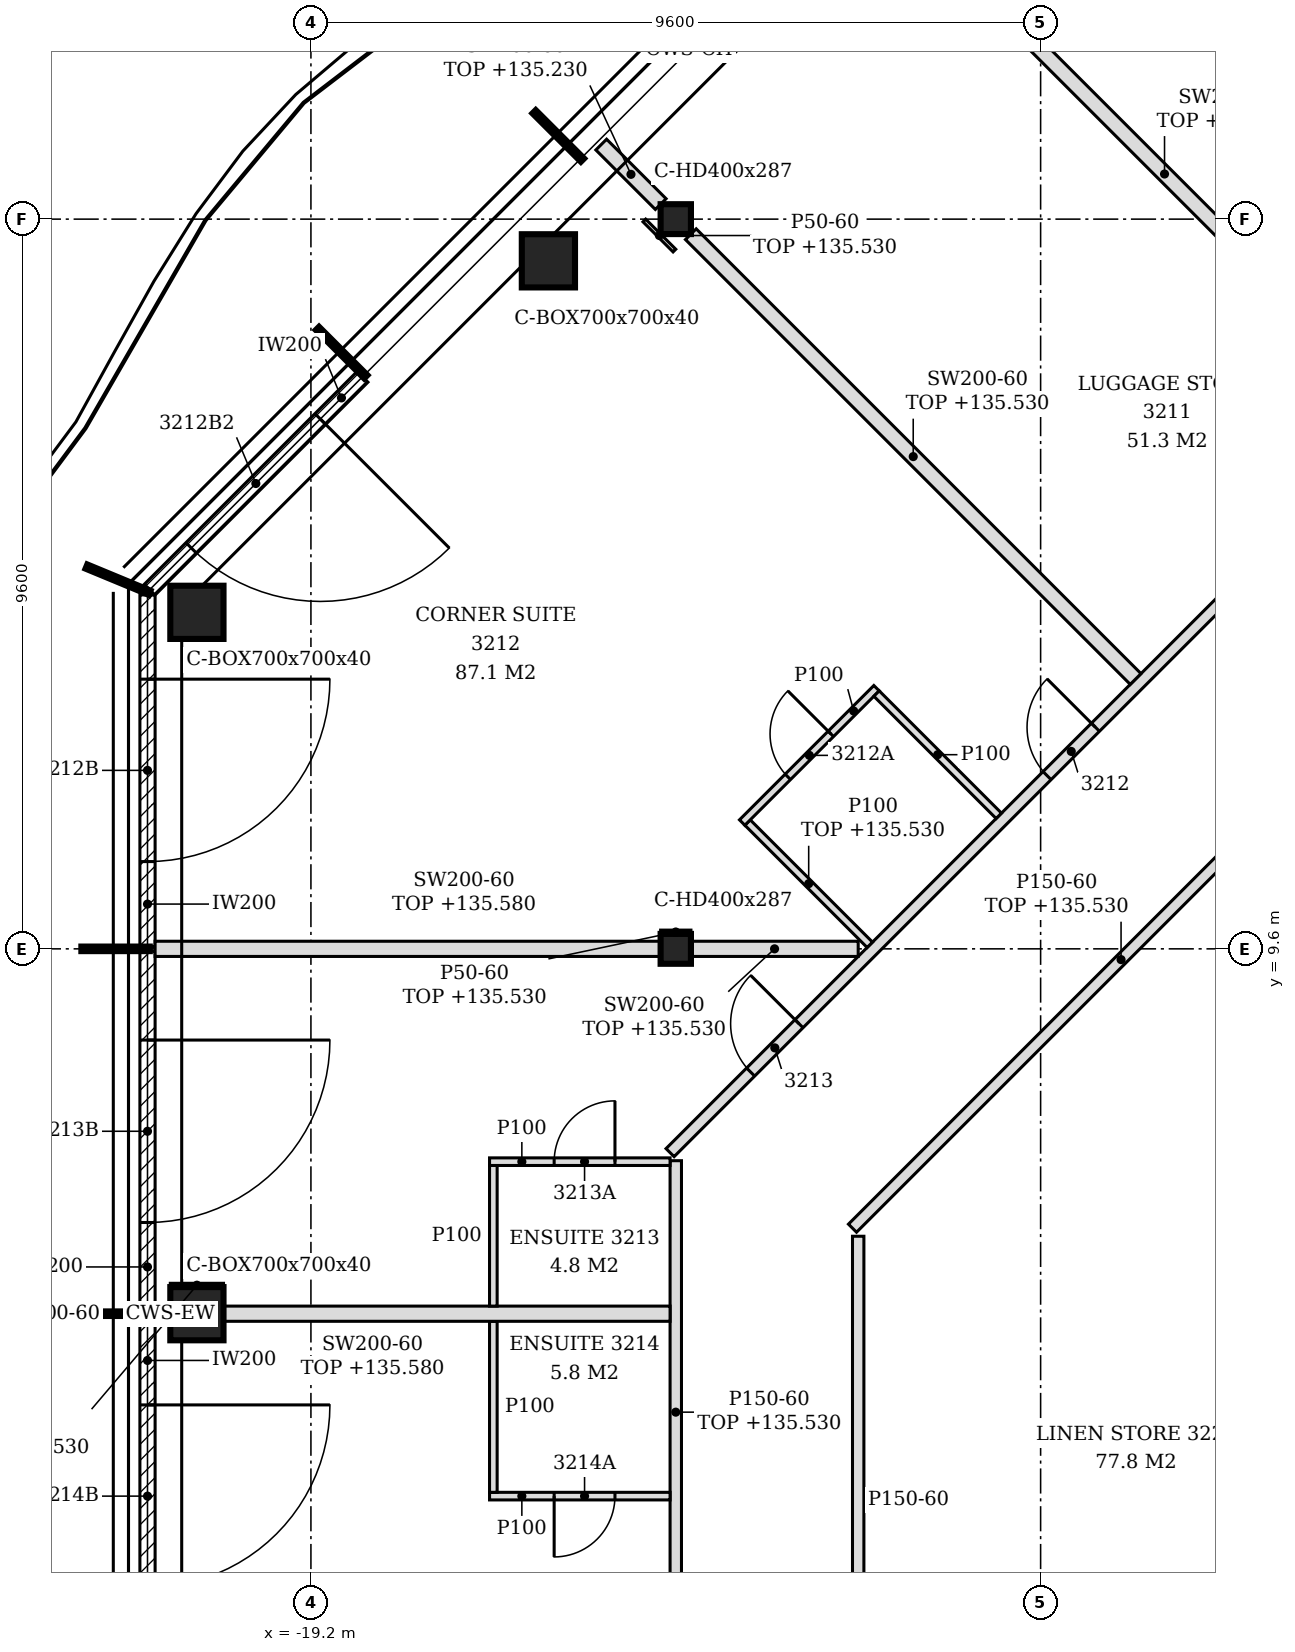
"""IFC4 building model, lengths in metres.
Left out: names, types, materials, properties, quantities, classifications, styles, units other than length and angle.
Written with IfcOpenShell. Run it as: python <this file> out.ifc"""

import sys

from ifc_helpers import new_model, si_unit, direction, frame, frame_2d, origin, origin_2d, place, context, subcontext, project, spatial, polyline, rectangle, hollow_rectangle, i_section, outline, extrude, element, fill, save


model = new_model("IFC4")
c1 = context("Model", 3, precision=1e-05, world=origin(), true_north=direction((0.0, 1.0)))
c2 = subcontext(c1, "Body", "Model", "MODEL_VIEW")
j1 = project(units=[si_unit("LENGTHUNIT", "METRE"), si_unit("PLANEANGLEUNIT", "RADIAN")], contexts=[c1])
p1 = place(None, origin())
s1 = spatial("IfcSite", under=j1, at=p1, CompositionType="ELEMENT")
p2 = place(p1, origin())
s2 = spatial("IfcBuilding", under=s1, at=p2, CompositionType="ELEMENT")
p3 = place(p2, frame((0.0, 0.0, 132.6)))
s3 = spatial("IfcBuildingStorey", under=s2, at=p3, CompositionType="ELEMENT", Elevation=132.6)
for number, where, z_axis, x_axis in (
    (1, (-16.076, 18.652, -0.15), (0.0, 0.0, 1.0), (1.0, 0.0, 0.0)),
    (2, (-20.7, 14.027, -0.15), (0.0, 0.0, 1.0), (1.0, 0.0, 0.0)),
    (3, (-20.7, 4.8, -0.15), (0.0, 0.0, 1.0), (1.0, 0.0, 0.0)),
):
    element("IfcColumn", number, at=place(p3, frame(where, z_axis=z_axis, x_axis=x_axis)), inside=s3, PredefinedType="COLUMN", context=c2, shape_type="SweptSolid", body=[
        extrude(hollow_rectangle(XDim=0.7, YDim=0.7, WallThickness=0.04, at=origin_2d()), origin(), (0.0, 0.0, 1.0), 3.6),
    ])
for number, where, z_axis, x_axis in (
    (4, (-14.4, 9.6, -0.15), (0.0, 0.0, 1.0), (1.0, 0.0, 0.0)),
    (5, (-14.4, 19.2, -0.15), (0.0, 0.0, 1.0), (1.0, 0.0, 0.0)),
):
    element("IfcColumn", number, at=place(p3, frame(where, z_axis=z_axis, x_axis=x_axis)), inside=s3, PredefinedType="COLUMN", context=c2, shape_type="SweptSolid", body=[
        extrude(i_section(OverallWidth=0.399, OverallDepth=0.393, WebThickness=0.023, FlangeThickness=0.037, FilletRadius=0.015, at=origin_2d()), origin(), (0.0, 0.0, 1.0), 3.6),
    ])
p4 = place(p3, frame((-18.521, 17.126, 0.0), z_axis=(0.0, 0.0, 1.0), x_axis=(-0.707106781187, -0.707106781187, 0.0)))
e6 = element("IfcWall", 6, at=p4, inside=s3, PredefinedType="NOTDEFINED", context=c2, shape_type="SweptSolid", body=[
    extrude(rectangle(XDim=3.962, YDim=0.2, at=frame_2d((1.981, 0.0))), origin(), (0.0, 0.0, 1.0), 3.45),
])
p5 = place(p4, frame((0.786, 0.0, 0.0)))
e7 = element("IfcOpeningElement", 7, at=p5, cuts=e6, PredefinedType="OPENING", context=c2, shape_type="SweptSolid", body=[
    extrude(rectangle(XDim=2.4, YDim=2.4, at=frame_2d((1.2, 1.2))), frame((0.0, 0.11, 0.0), z_axis=(0.0, -1.0, 0.0), x_axis=(1.0, 0.0, 0.0)), (0.0, 0.0, 1.0), 0.22),
])
p6 = place(p3, frame((-21.35, 14.256, 0.0), z_axis=(0.0, 0.0, 1.0), x_axis=(0.0, -1.0, 0.0)))
e8 = element("IfcWall", 8, at=p6, inside=s3, PredefinedType="NOTDEFINED", context=c2, shape_type="SweptSolid", body=[
    extrude(rectangle(XDim=4.626, YDim=0.2, at=frame_2d((2.313, 0.0))), origin(), (0.0, 0.0, 1.0), 3.45),
])
p7 = place(p6, frame((1.108, 0.0, 0.0)))
e9 = element("IfcOpeningElement", 9, at=p7, cuts=e8, PredefinedType="OPENING", context=c2, shape_type="SweptSolid", body=[
    extrude(rectangle(XDim=2.4, YDim=2.4, at=frame_2d((1.2, 1.2))), frame((0.0, 0.11, 0.0), z_axis=(0.0, -1.0, 0.0), x_axis=(1.0, 0.0, 0.0)), (0.0, 0.0, 1.0), 0.22),
])
p8 = place(p3, frame((-21.35, 9.57, 0.0), z_axis=(0.0, 0.0, 1.0), x_axis=(0.0, -1.0, 0.0)))
e10 = element("IfcWall", 10, at=p8, inside=s3, PredefinedType="NOTDEFINED", context=c2, shape_type="SweptSolid", body=[
    extrude(rectangle(XDim=4.74, YDim=0.2, at=frame_2d((2.37, 0.0))), origin(), (0.0, 0.0, 1.0), 3.45),
])
p9 = place(p8, frame((1.17, 0.0, 0.0)))
e11 = element("IfcOpeningElement", 11, at=p9, cuts=e10, PredefinedType="OPENING", context=c2, shape_type="SweptSolid", body=[
    extrude(rectangle(XDim=2.4, YDim=2.4, at=frame_2d((1.2, 1.2))), frame((0.0, 0.11, 0.0), z_axis=(0.0, -1.0, 0.0), x_axis=(1.0, 0.0, 0.0)), (0.0, 0.0, 1.0), 0.22),
])
p10 = place(p3, frame((-21.35, 4.77, 0.0), z_axis=(0.0, 0.0, 1.0), x_axis=(0.0, -1.0, 0.0)))
e12 = element("IfcWall", 12, at=p10, inside=s3, PredefinedType="NOTDEFINED", context=c2, shape_type="SweptSolid", body=[
    extrude(rectangle(XDim=4.74, YDim=0.2, at=frame_2d((2.37, 0.0))), origin(), (0.0, 0.0, 1.0), 3.45),
])
p11 = place(p10, frame((1.17, 0.0, 0.0)))
e13 = element("IfcOpeningElement", 13, at=p11, cuts=e12, PredefinedType="OPENING", context=c2, shape_type="SweptSolid", body=[
    extrude(rectangle(XDim=2.4, YDim=2.4, at=frame_2d((1.2, 1.2))), frame((0.0, 0.11, 0.0), z_axis=(0.0, -1.0, 0.0), x_axis=(1.0, 0.0, 0.0)), (0.0, 0.0, 1.0), 0.22),
])
p12 = place(p3, frame((-12.0, -1.125, 0.0), z_axis=(0.0, 0.0, 1.0), x_axis=(0.0, 1.0, 0.0)))
e14 = element("IfcWall", 14, at=p12, inside=s3, PredefinedType="PARTITIONING", context=c2, shape_type="SweptSolid", body=[
    extrude(outline(polyline([(0.0, 0.0), (6.944, 0.0), (6.944, 3.45), (6.025, 3.45), (6.023, 2.93), (5.825, 2.93), (5.823, 3.45), (1.225, 3.45), (1.223, 2.93), (1.025, 2.93), (1.023, 3.45), (0.0, 3.45), (0.0, 0.0)])), frame((0.0, 0.075, 0.0), z_axis=(0.0, -1.0, 0.0), x_axis=(1.0, 0.0, 0.0)), (0.0, 0.0, 1.0), 0.15),
])
p13 = place(p3, frame((-14.4, 0.197, 0.0), z_axis=(0.0, 0.0, 1.0), x_axis=(0.0, 1.0, 0.0)))
e15 = element("IfcWall", 15, at=p13, inside=s3, PredefinedType="PARTITIONING", context=c2, shape_type="SweptSolid", body=[
    extrude(rectangle(XDim=6.616, YDim=0.15, at=frame_2d((3.308, 0.0))), origin(), (0.0, 0.0, 1.0), 2.93),
])
p14 = place(p3, frame((-16.85, 2.4, 0.0), z_axis=(0.0, 0.0, 1.0), x_axis=(1.0, 0.0, 0.0)))
e16 = element("IfcWall", 16, at=p14, inside=s3, PredefinedType="PARTITIONING", context=c2, shape_type="SweptSolid", body=[
    extrude(outline(polyline([(0.0, 0.0), (2.375, 0.0), (2.375, 2.93), (2.3, 2.93), (2.298, 3.45), (0.0, 3.45), (0.0, 0.0)])), frame((0.0, 0.05, 0.0), z_axis=(0.0, -1.0, 0.0), x_axis=(1.0, 0.0, 0.0)), (0.0, 0.0, 1.0), 0.1),
])
p15 = place(p14, frame((0.85, 0.0, 0.0)))
e17 = element("IfcOpeningElement", 17, at=p15, cuts=e16, PredefinedType="OPENING", context=c2, shape_type="SweptSolid", body=[
    extrude(rectangle(XDim=0.8, YDim=2.1, at=frame_2d((0.4, 1.05))), frame((0.0, 0.06, 0.0), z_axis=(0.0, -1.0, 0.0), x_axis=(1.0, 0.0, 0.0)), (0.0, 0.0, 1.0), 0.12),
])
p16 = place(p3, frame((-16.8, 2.45, 0.0), z_axis=(0.0, 0.0, 1.0), x_axis=(0.0, 1.0, 0.0)))
e18 = element("IfcWall", 18, at=p16, inside=s3, PredefinedType="PARTITIONING", context=c2, shape_type="SweptSolid", body=[
    extrude(rectangle(XDim=2.25, YDim=0.1, at=frame_2d((1.125, 0.0))), origin(), (0.0, 0.0, 1.0), 3.45),
])
p17 = place(p3, frame((-21.25, 4.8, 0.0), z_axis=(0.0, 0.0, 1.0), x_axis=(1.0, 0.0, 0.0)))
e19 = element("IfcWall", 19, at=p17, inside=s3, PredefinedType="PARTITIONING", context=c2, shape_type="SweptSolid", body=[
    extrude(rectangle(XDim=0.2, YDim=0.2, at=frame_2d((0.1, 0.0))), origin(), (0.0, 0.0, 1.0), 3.45),
])
p18 = place(p3, frame((-20.35, 4.8, 0.0), z_axis=(0.0, 0.0, 1.0), x_axis=(1.0, 0.0, 0.0)))
e20 = element("IfcWall", 20, at=p18, inside=s3, PredefinedType="PARTITIONING", context=c2, shape_type="SweptSolid", body=[
    extrude(outline(polyline([(0.0, 0.0), (5.875, 0.0), (5.875, 2.93), (5.8, 2.93), (5.798, 2.98), (0.0, 2.98), (0.0, 0.0)])), frame((0.0, 0.1, 0.0), z_axis=(0.0, -1.0, 0.0), x_axis=(1.0, 0.0, 0.0)), (0.0, 0.0, 1.0), 0.2),
])
p19 = place(p3, frame((-16.8, 4.9, 0.0), z_axis=(0.0, 0.0, 1.0), x_axis=(0.0, 1.0, 0.0)))
e21 = element("IfcWall", 21, at=p19, inside=s3, PredefinedType="PARTITIONING", context=c2, shape_type="SweptSolid", body=[
    extrude(rectangle(XDim=1.85, YDim=0.1, at=frame_2d((0.925, 0.0))), origin(), (0.0, 0.0, 1.0), 3.45),
])
p20 = place(p3, frame((-12.075, 5.925, 0.0), z_axis=(0.0, 0.0, 1.0), x_axis=(0.707106781187, 0.707106781187, 0.0)))
e22 = element("IfcWall", 22, at=p20, inside=s3, PredefinedType="PARTITIONING", context=c2, shape_type="SweptSolid", body=[
    extrude(rectangle(XDim=9.993, YDim=0.15, at=frame_2d((4.997, 0.0))), origin(), (0.0, 0.0, 1.0), 2.93),
])
p21 = place(p3, frame((-16.85, 6.8, 0.0), z_axis=(0.0, 0.0, 1.0), x_axis=(1.0, 0.0, 0.0)))
e23 = element("IfcWall", 23, at=p21, inside=s3, PredefinedType="PARTITIONING", context=c2, shape_type="SweptSolid", body=[
    extrude(outline(polyline([(0.0, 0.0), (2.375, 0.0), (2.375, 2.93), (2.3, 2.93), (2.298, 3.45), (0.0, 3.45), (0.0, 0.0)])), frame((0.0, 0.05, 0.0), z_axis=(0.0, -1.0, 0.0), x_axis=(1.0, 0.0, 0.0)), (0.0, 0.0, 1.0), 0.1),
])
p22 = place(p21, frame((0.85, 0.0, 0.0)))
e24 = element("IfcOpeningElement", 24, at=p22, cuts=e23, PredefinedType="OPENING", context=c2, shape_type="SweptSolid", body=[
    extrude(rectangle(XDim=0.8, YDim=2.1, at=frame_2d((0.4, 1.05))), frame((0.0, 0.06, 0.0), z_axis=(0.0, -1.0, 0.0), x_axis=(1.0, 0.0, 0.0)), (0.0, 0.0, 1.0), 0.12),
])
p23 = place(p3, frame((-14.475, 6.919, 0.0), z_axis=(0.0, 0.0, 1.0), x_axis=(0.707106781187, 0.707106781187, 0.0)))
e25 = element("IfcWall", 25, at=p23, inside=s3, PredefinedType="PARTITIONING", context=c2, shape_type="SweptSolid", body=[
    extrude(rectangle(XDim=20.581, YDim=0.15, at=frame_2d((10.291, 0.0))), origin(), (0.0, 0.0, 1.0), 2.73),
])
p24 = place(p23, frame((17.983, 0.0, 0.0)))
e26 = element("IfcOpeningElement", 26, at=p24, cuts=e25, PredefinedType="OPENING", context=c2, shape_type="SweptSolid", body=[
    extrude(rectangle(XDim=0.9, YDim=2.1, at=frame_2d((0.45, 1.05))), frame((0.0, 0.085, 0.0), z_axis=(0.0, -1.0, 0.0), x_axis=(1.0, 0.0, 0.0)), (0.0, 0.0, 1.0), 0.17),
])
p25 = place(p23, frame((10.77, 0.0, 0.0)))
e27 = element("IfcOpeningElement", 27, at=p25, cuts=e25, PredefinedType="OPENING", context=c2, shape_type="SweptSolid", body=[
    extrude(rectangle(XDim=0.9, YDim=2.1, at=frame_2d((0.45, 1.05))), frame((0.0, 0.085, 0.0), z_axis=(0.0, -1.0, 0.0), x_axis=(1.0, 0.0, 0.0)), (0.0, 0.0, 1.0), 0.17),
])
p26 = place(p23, frame((7.014, 0.0, 0.0)))
e28 = element("IfcOpeningElement", 28, at=p26, cuts=e25, PredefinedType="OPENING", context=c2, shape_type="SweptSolid", body=[
    extrude(rectangle(XDim=0.9, YDim=2.1, at=frame_2d((0.45, 1.05))), frame((0.0, 0.085, 0.0), z_axis=(0.0, -1.0, 0.0), x_axis=(1.0, 0.0, 0.0)), (0.0, 0.0, 1.0), 0.17),
])
p27 = place(p23, frame((1.499, 0.0, 0.0)))
e29 = element("IfcOpeningElement", 29, at=p27, cuts=e25, PredefinedType="OPENING", context=c2, shape_type="SweptSolid", body=[
    extrude(rectangle(XDim=0.9, YDim=2.1, at=frame_2d((0.45, 1.05))), frame((0.0, 0.085, 0.0), z_axis=(0.0, -1.0, 0.0), x_axis=(1.0, 0.0, 0.0)), (0.0, 0.0, 1.0), 0.17),
])
p28 = place(p3, frame((-21.25, 9.6, 0.0), z_axis=(0.0, 0.0, 1.0), x_axis=(1.0, 0.0, 0.0)))
e30 = element("IfcWall", 30, at=p28, inside=s3, PredefinedType="PARTITIONING", context=c2, shape_type="SweptSolid", body=[
    extrude(outline(polyline([(0.0, 0.0), (6.65, 0.0), (6.65, 2.98), (0.7, 2.98), (0.698, 2.93), (0.4, 2.93), (0.398, 2.98), (0.0, 2.98), (0.0, 0.0)])), frame((0.0, 0.1, 0.0), z_axis=(0.0, -1.0, 0.0), x_axis=(1.0, 0.0, 0.0)), (0.0, 0.0, 1.0), 0.2),
])
p29 = place(p3, frame((-14.2, 9.6, 0.0), z_axis=(0.0, 0.0, 1.0), x_axis=(1.0, 0.0, 0.0)))
e31 = element("IfcWall", 31, at=p29, inside=s3, PredefinedType="PARTITIONING", context=c2, shape_type="SweptSolid", body=[
    extrude(rectangle(XDim=2.2, YDim=0.2, at=frame_2d((1.1, 0.0))), origin(), (0.0, 0.0, 1.0), 2.93),
])
p30 = place(p3, frame((-11.847, 9.653, 0.0), z_axis=(0.0, 0.0, 1.0), x_axis=(-0.707106781187, 0.707106781187, 0.0)))
e32 = element("IfcWall", 32, at=p30, inside=s3, PredefinedType="PARTITIONING", context=c2, shape_type="SweptSolid", body=[
    extrude(rectangle(XDim=2.275, YDim=0.1, at=frame_2d((1.137, 0.0))), origin(), (0.0, 0.0, 1.0), 2.93),
])
p31 = place(p3, frame((-13.526, 11.262, 0.0), z_axis=(0.0, 0.0, 1.0), x_axis=(0.707106781187, 0.707106781187, 0.0)))
e33 = element("IfcWall", 33, at=p31, inside=s3, PredefinedType="PARTITIONING", context=c2, shape_type="SweptSolid", body=[
    extrude(rectangle(XDim=2.5, YDim=0.1, at=frame_2d((1.25, 0.0))), origin(), (0.0, 0.0, 1.0), 3.45),
])
p32 = place(p31, frame((0.85, 0.0, 0.0)))
e34 = element("IfcOpeningElement", 34, at=p32, cuts=e33, PredefinedType="OPENING", context=c2, shape_type="SweptSolid", body=[
    extrude(rectangle(XDim=0.8, YDim=2.1, at=frame_2d((0.4, 1.05))), frame((0.0, 0.06, 0.0), z_axis=(0.0, -1.0, 0.0), x_axis=(1.0, 0.0, 0.0)), (0.0, 0.0, 1.0), 0.12),
])
p33 = place(p3, frame((-10.15, 11.35, 0.0), z_axis=(0.0, 0.0, 1.0), x_axis=(-0.707160441348, 0.707053116953, 0.0)))
e35 = element("IfcWall", 35, at=p33, inside=s3, PredefinedType="PARTITIONING", context=c2, shape_type="SweptSolid", body=[
    extrude(rectangle(XDim=2.275, YDim=0.1, at=frame_2d((1.137, 0.0))), origin(), (0.0, 0.0, 1.0), 3.45),
])
p34 = place(p3, frame((-8.35, 13.15, 0.0), z_axis=(0.0, 0.0, 1.0), x_axis=(-0.707092030896, 0.707121531169, 0.0)))
e36 = element("IfcWall", 36, at=p34, inside=s3, PredefinedType="PARTITIONING", context=c2, shape_type="SweptSolid", body=[
    extrude(rectangle(XDim=8.276, YDim=0.2, at=frame_2d((4.138, 0.0))), origin(), (0.0, 0.0, 1.0), 2.93),
])
p35 = place(p3, frame((-4.838, 16.662, 0.0), z_axis=(0.0, 0.0, 1.0), x_axis=(-0.707120561855, 0.707093000249, 0.0)))
e37 = element("IfcWall", 37, at=p35, inside=s3, PredefinedType="PARTITIONING", context=c2, shape_type="SweptSolid", body=[
    extrude(rectangle(XDim=8.858, YDim=0.2, at=frame_2d((4.429, 0.0))), origin(), (0.0, 0.0, 1.0), 2.73),
])
p36 = place(p3, frame((-14.598, 19.398, 0.0), z_axis=(0.0, 0.0, 1.0), x_axis=(-0.707106781187, 0.707106781187, 0.0)))
e38 = element("IfcWall", 38, at=p36, inside=s3, PredefinedType="PARTITIONING", context=c2, shape_type="SweptSolid", body=[
    extrude(rectangle(XDim=1.107, YDim=0.2, at=frame_2d((0.554, 0.0))), origin(), (0.0, 0.0, 1.0), 2.63),
])
p37 = place(p3, frame((-21.05, 5.175, 0.0), z_axis=(0.0, 0.0, 1.0), x_axis=(1.0, 0.0, 0.0)))
e39 = element("IfcWall", 39, at=p37, inside=s3, PredefinedType="PARTITIONING", context=c2, shape_type="SweptSolid", body=[
    extrude(rectangle(XDim=0.7, YDim=0.05, at=frame_2d((0.35, 0.0))), origin(), (0.0, 0.0, 1.0), 2.93),
])
p38 = place(p3, frame((-14.6, 9.822, 0.0), z_axis=(0.0, 0.0, 1.0), x_axis=(1.0, 0.0, 0.0)))
e40 = element("IfcWall", 40, at=p38, inside=s3, PredefinedType="PARTITIONING", context=c2, shape_type="SweptSolid", body=[
    extrude(rectangle(XDim=0.399, YDim=0.05, at=frame_2d((0.2, 0.0))), origin(), (0.0, 0.0, 1.0), 2.93),
])
p39 = place(p3, frame((-14.418, 18.786, 0.0), z_axis=(0.0, 0.0, 1.0), x_axis=(-0.707106781187, 0.707106781187, 0.0)))
e41 = element("IfcWall", 41, at=p39, inside=s3, PredefinedType="PARTITIONING", context=c2, shape_type="SweptSolid", body=[
    extrude(rectangle(XDim=0.56, YDim=0.05, at=frame_2d((0.28, 0.0))), origin(), (0.0, 0.0, 1.0), 2.93),
])
p40 = place(p5, origin())
e42 = element("IfcDoor", 42, at=p40, inside=s3, OperationType="SINGLE_SWING_LEFT", PredefinedType="DOOR", context=c2, shape_type="SweptSolid", body=[
    extrude(rectangle(XDim=2.4, YDim=2.4, at=frame_2d((1.2, 1.2))), frame((0.0, 0.025, 0.0), z_axis=(0.0, -1.0, 0.0), x_axis=(1.0, 0.0, 0.0)), (0.0, 0.0, 1.0), 0.05),
])
fill(e7, e42)
p41 = place(p7, origin())
e43 = element("IfcDoor", 43, at=p41, inside=s3, OperationType="SINGLE_SWING_LEFT", PredefinedType="DOOR", context=c2, shape_type="SweptSolid", body=[
    extrude(rectangle(XDim=2.4, YDim=2.4, at=frame_2d((1.2, 1.2))), frame((0.0, 0.025, 0.0), z_axis=(0.0, -1.0, 0.0), x_axis=(1.0, 0.0, 0.0)), (0.0, 0.0, 1.0), 0.05),
])
fill(e9, e43)
p42 = place(p9, origin())
e44 = element("IfcDoor", 44, at=p42, inside=s3, OperationType="SINGLE_SWING_LEFT", PredefinedType="DOOR", context=c2, shape_type="SweptSolid", body=[
    extrude(rectangle(XDim=2.4, YDim=2.4, at=frame_2d((1.2, 1.2))), frame((0.0, 0.025, 0.0), z_axis=(0.0, -1.0, 0.0), x_axis=(1.0, 0.0, 0.0)), (0.0, 0.0, 1.0), 0.05),
])
fill(e11, e44)
p43 = place(p11, origin())
e45 = element("IfcDoor", 45, at=p43, inside=s3, OperationType="SINGLE_SWING_LEFT", PredefinedType="DOOR", context=c2, shape_type="SweptSolid", body=[
    extrude(rectangle(XDim=2.4, YDim=2.4, at=frame_2d((1.2, 1.2))), frame((0.0, 0.025, 0.0), z_axis=(0.0, -1.0, 0.0), x_axis=(1.0, 0.0, 0.0)), (0.0, 0.0, 1.0), 0.05),
])
fill(e13, e45)
p44 = place(p26, origin())
e46 = element("IfcDoor", 46, at=p44, inside=s3, OperationType="SINGLE_SWING_RIGHT", PredefinedType="DOOR", context=c2, shape_type="SweptSolid", body=[
    extrude(rectangle(XDim=0.9, YDim=2.1, at=frame_2d((0.45, 1.05))), frame((0.0, 0.025, 0.0), z_axis=(0.0, -1.0, 0.0), x_axis=(1.0, 0.0, 0.0)), (0.0, 0.0, 1.0), 0.05),
])
fill(e28, e46)
p45 = place(p32, origin())
e47 = element("IfcDoor", 47, at=p45, inside=s3, OperationType="SINGLE_SWING_RIGHT", PredefinedType="DOOR", context=c2, shape_type="SweptSolid", body=[
    extrude(rectangle(XDim=0.8, YDim=2.1, at=frame_2d((0.4, 1.05))), frame((0.0, 0.025, 0.0), z_axis=(0.0, -1.0, 0.0), x_axis=(1.0, 0.0, 0.0)), (0.0, 0.0, 1.0), 0.05),
])
fill(e34, e47)
p46 = place(p27, origin())
e48 = element("IfcDoor", 48, at=p46, inside=s3, OperationType="SINGLE_SWING_RIGHT", PredefinedType="DOOR", context=c2, shape_type="SweptSolid", body=[
    extrude(rectangle(XDim=0.9, YDim=2.1, at=frame_2d((0.45, 1.05))), frame((0.0, 0.025, 0.0), z_axis=(0.0, -1.0, 0.0), x_axis=(1.0, 0.0, 0.0)), (0.0, 0.0, 1.0), 0.05),
])
fill(e29, e48)
p47 = place(p22, origin())
e49 = element("IfcDoor", 49, at=p47, inside=s3, OperationType="SINGLE_SWING_RIGHT", PredefinedType="DOOR", context=c2, shape_type="SweptSolid", body=[
    extrude(rectangle(XDim=0.8, YDim=2.1, at=frame_2d((0.4, 1.05))), frame((0.0, 0.025, 0.0), z_axis=(0.0, -1.0, 0.0), x_axis=(1.0, 0.0, 0.0)), (0.0, 0.0, 1.0), 0.05),
])
fill(e24, e49)
p48 = place(p15, frame((0.8, 0.0, 0.0), z_axis=(0.0, 0.0, 1.0), x_axis=(-1.0, 0.0, 0.0)))
e50 = element("IfcDoor", 50, at=p48, inside=s3, OperationType="SINGLE_SWING_RIGHT", PredefinedType="DOOR", context=c2, shape_type="SweptSolid", body=[
    extrude(rectangle(XDim=0.8, YDim=2.1, at=frame_2d((0.4, 1.05))), frame((0.0, 0.025, 0.0), z_axis=(0.0, -1.0, 0.0), x_axis=(1.0, 0.0, 0.0)), (0.0, 0.0, 1.0), 0.05),
])
fill(e17, e50)
save(model, sys.argv[1])
